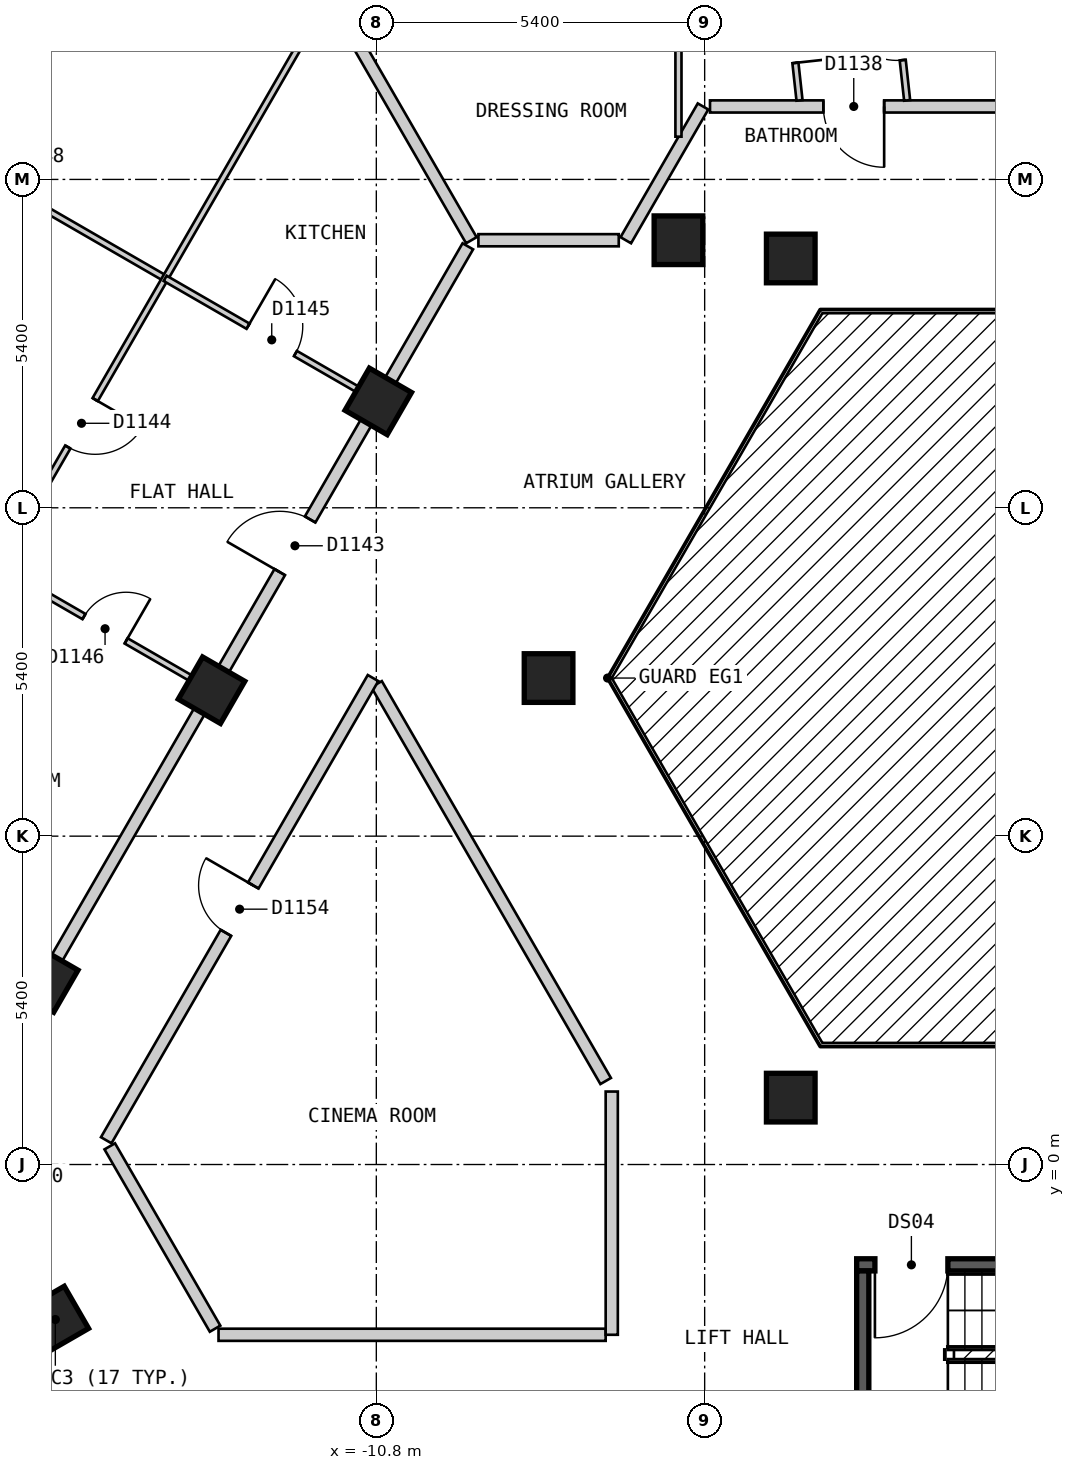
"""IFC4 building model, lengths in metres.
Left out: names, types, materials, properties, quantities, classifications, styles, units other than length and angle.
Written with IfcOpenShell. Run it as: python <this file> out.ifc"""

import sys

from ifc_helpers import new_model, si_unit, direction, frame, frame_2d, origin, origin_2d, place, context, subcontext, project, spatial, polyline, rectangle, outline, extrude, element, fill, save


model = new_model("IFC4")
c1 = context("Model", 3, precision=1e-05, world=origin(), true_north=direction((0.0, 1.0)))
c2 = subcontext(c1, "Body", "Model", "MODEL_VIEW")
j1 = project(units=[si_unit("LENGTHUNIT", "METRE"), si_unit("PLANEANGLEUNIT", "RADIAN")], contexts=[c1])
p1 = place(None, origin())
s1 = spatial("IfcSite", under=j1, at=p1, CompositionType="ELEMENT")
p2 = place(p1, origin())
s2 = spatial("IfcBuilding", under=s1, at=p2, CompositionType="ELEMENT")
p3 = place(p2, frame((0.0, 0.0, 138.6)))
s3 = spatial("IfcBuildingStorey", under=s2, at=p3, CompositionType="ELEMENT", Elevation=138.6)
for number, where, z_axis, x_axis in (
    (1, (-16.079, -2.549, 0.0), (0.0, 0.0, 1.0), (0.5, -0.866, 0.0)),
    (2, (-3.984, 14.9, 0.0), (0.0, 0.0, 1.0), (1.0, 0.0, 0.0)),
    (3, (-5.831, 15.2, 0.0), (0.0, 0.0, 1.0), (-1.0, 0.0, 0.0)),
    (4, (-10.768, 12.55, 0.0), (0.0, 0.0, 1.0), (-0.5, -0.866, 0.0)),
    (5, (-7.967, 8.0, 0.0), (0.0, 0.0, 1.0), (1.0, 0.0, 0.0)),
    (6, (-13.51, 7.8, 0.0), (0.0, 0.0, 1.0), (-0.5, -0.866, 0.0)),
    (7, (-3.984, 1.1, 0.0), (0.0, 0.0, 1.0), (1.0, 0.0, 0.0)),
    (8, (-16.253, 3.05, 0.0), (0.0, 0.0, 1.0), (-0.5, -0.866, 0.0)),
):
    element("IfcColumn", number, at=place(p3, frame(where, z_axis=z_axis, x_axis=x_axis)), inside=s3, PredefinedType="COLUMN", context=c2, shape_type="SweptSolid", body=[
        extrude(rectangle(XDim=0.8, YDim=0.8, at=origin_2d()), origin(), (0.0, 0.0, 1.0), 3.0),
    ])
p4 = place(p3, frame((-28.218, -2.025, 0.0), z_axis=(0.0, 0.0, 1.0), x_axis=(0.500017503135, -0.866015298109, 0.0)))
e9 = element("IfcWall", 9, at=p4, inside=s3, PredefinedType="SOLIDWALL", context=c2, shape_type="SweptSolid", body=[
    extrude(outline(polyline([(0.0, -0.15), (24.711, -0.15), (24.631, 0.15), (0.08, 0.15), (0.0, -0.15)])), origin(), (0.0, 0.0, 1.0), 2.7),
])
p5 = place(p4, frame((1.4, 0.0, 0.15)))
e10 = element("IfcOpeningElement", 10, at=p5, cuts=e9, PredefinedType="OPENING", context=c2, shape_type="SweptSolid", body=[
    extrude(rectangle(XDim=1.5, YDim=2.1, at=frame_2d((0.75, 1.05))), frame((0.0, 0.16, 0.0), z_axis=(0.0, -1.0, 0.0), x_axis=(1.0, 0.0, 0.0)), (0.0, 0.0, 1.0), 0.32),
])
p6 = place(p4, frame((4.316, 0.0, 0.15)))
e11 = element("IfcOpeningElement", 11, at=p6, cuts=e9, PredefinedType="OPENING", context=c2, shape_type="SweptSolid", body=[
    extrude(rectangle(XDim=1.5, YDim=2.1, at=frame_2d((0.75, 1.05))), frame((0.0, 0.16, 0.0), z_axis=(0.0, -1.0, 0.0), x_axis=(1.0, 0.0, 0.0)), (0.0, 0.0, 1.0), 0.32),
])
p7 = place(p4, frame((7.231, 0.0, 0.15)))
e12 = element("IfcOpeningElement", 12, at=p7, cuts=e9, PredefinedType="OPENING", context=c2, shape_type="SweptSolid", body=[
    extrude(rectangle(XDim=1.5, YDim=2.1, at=frame_2d((0.75, 1.05))), frame((0.0, 0.16, 0.0), z_axis=(0.0, -1.0, 0.0), x_axis=(1.0, 0.0, 0.0)), (0.0, 0.0, 1.0), 0.32),
])
p8 = place(p4, frame((10.147, 0.0, 0.15)))
e13 = element("IfcOpeningElement", 13, at=p8, cuts=e9, PredefinedType="OPENING", context=c2, shape_type="SweptSolid", body=[
    extrude(rectangle(XDim=1.5, YDim=2.1, at=frame_2d((0.75, 1.05))), frame((0.0, 0.16, 0.0), z_axis=(0.0, -1.0, 0.0), x_axis=(1.0, 0.0, 0.0)), (0.0, 0.0, 1.0), 0.32),
])
p9 = place(p4, frame((13.062, 0.0, 0.15)))
e14 = element("IfcOpeningElement", 14, at=p9, cuts=e9, PredefinedType="OPENING", context=c2, shape_type="SweptSolid", body=[
    extrude(rectangle(XDim=1.5, YDim=2.1, at=frame_2d((0.75, 1.05))), frame((0.0, 0.16, 0.0), z_axis=(0.0, -1.0, 0.0), x_axis=(1.0, 0.0, 0.0)), (0.0, 0.0, 1.0), 0.32),
])
p10 = place(p4, frame((15.977, 0.0, 0.15)))
e15 = element("IfcOpeningElement", 15, at=p10, cuts=e9, PredefinedType="OPENING", context=c2, shape_type="SweptSolid", body=[
    extrude(rectangle(XDim=1.5, YDim=2.1, at=frame_2d((0.75, 1.05))), frame((0.0, 0.16, 0.0), z_axis=(0.0, -1.0, 0.0), x_axis=(1.0, 0.0, 0.0)), (0.0, 0.0, 1.0), 0.32),
])
p11 = place(p4, frame((18.893, 0.0, 0.15)))
e16 = element("IfcOpeningElement", 16, at=p11, cuts=e9, PredefinedType="OPENING", context=c2, shape_type="SweptSolid", body=[
    extrude(rectangle(XDim=1.5, YDim=2.1, at=frame_2d((0.75, 1.05))), frame((0.0, 0.16, 0.0), z_axis=(0.0, -1.0, 0.0), x_axis=(1.0, 0.0, 0.0)), (0.0, 0.0, 1.0), 0.32),
])
p12 = place(p4, frame((21.809, 0.0, 0.15)))
e17 = element("IfcOpeningElement", 17, at=p12, cuts=e9, PredefinedType="OPENING", context=c2, shape_type="SweptSolid", body=[
    extrude(rectangle(XDim=1.5, YDim=2.1, at=frame_2d((0.75, 1.05))), frame((0.0, 0.16, 0.0), z_axis=(0.0, -1.0, 0.0), x_axis=(1.0, 0.0, 0.0)), (0.0, 0.0, 1.0), 0.32),
])
p13 = place(p3, frame((-2.9, -1.65, 0.0), z_axis=(0.0, 0.0, 1.0), x_axis=(1.0, 0.0, 0.0)))
e18 = element("IfcWall", 18, at=p13, inside=s3, PredefinedType="SOLIDWALL", context=c2, shape_type="SweptSolid", body=[
    extrude(rectangle(XDim=5.8, YDim=0.2, at=frame_2d((2.9, 0.0))), origin(), (0.0, 0.0, 1.0), 2.7),
])
p14 = place(p13, frame((0.3, 0.0, 0.0)))
e19 = element("IfcOpeningElement", 19, at=p14, cuts=e18, PredefinedType="OPENING", context=c2, shape_type="SweptSolid", body=[
    extrude(rectangle(XDim=1.2, YDim=2.1, at=frame_2d((0.6, 1.05))), frame((0.0, 0.11, 0.0), z_axis=(0.0, -1.0, 0.0), x_axis=(1.0, 0.0, 0.0)), (0.0, 0.0, 1.0), 0.22),
])
p15 = place(p3, frame((-2.8, -4.5, 0.0), z_axis=(0.0, 0.0, 1.0), x_axis=(0.0, 1.0, 0.0)))
e20 = element("IfcWall", 20, at=p15, inside=s3, PredefinedType="SOLIDWALL", context=c2, shape_type="SweptSolid", body=[
    extrude(rectangle(XDim=2.75, YDim=0.2, at=frame_2d((1.375, 0.0))), origin(), (0.0, 0.0, 1.0), 2.7),
])
p16 = place(p3, frame((-10.796, 7.9, 0.0), z_axis=(0.0, 0.0, 1.0), x_axis=(0.499954271211, -0.866051803703, 0.0)))
e21 = element("IfcWall", 21, at=p16, inside=s3, PredefinedType="PARTITIONING", context=c2, shape_type="SweptSolid", body=[
    extrude(rectangle(XDim=7.536, YDim=0.2, at=frame_2d((3.768, 0.0))), origin(), (0.0, 0.0, 1.0), 2.7),
])
p17 = place(p3, frame((-15.184, 0.299, 0.0), z_axis=(0.0, 0.0, 1.0), x_axis=(0.500149577091, -0.865939028186, 0.0)))
e22 = element("IfcWall", 22, at=p17, inside=s3, PredefinedType="PARTITIONING", context=c2, shape_type="SweptSolid", body=[
    extrude(rectangle(XDim=3.463, YDim=0.2, at=frame_2d((1.732, 0.0))), origin(), (0.0, 0.0, 1.0), 2.7),
])
p18 = place(p3, frame((-17.724, 0.299, 0.0), z_axis=(0.0, 0.0, 1.0), x_axis=(0.499910220442, -0.866077231832, 0.0)))
e23 = element("IfcWall", 23, at=p18, inside=s3, PredefinedType="PARTITIONING", context=c2, shape_type="SweptSolid", body=[
    extrude(rectangle(XDim=3.189, YDim=0.2, at=frame_2d((1.594, 0.0))), origin(), (0.0, 0.0, 1.0), 2.7),
])
p19 = place(p18, frame((0.183, 0.0, 0.0)))
e24 = element("IfcOpeningElement", 24, at=p19, cuts=e23, PredefinedType="OPENING", context=c2, shape_type="SweptSolid", body=[
    extrude(rectangle(XDim=0.8, YDim=2.1, at=frame_2d((0.4, 1.05))), frame((0.0, 0.11, 0.0), z_axis=(0.0, -1.0, 0.0), x_axis=(1.0, 0.0, 0.0)), (0.0, 0.0, 1.0), 0.22),
])
p20 = place(p3, frame((-13.395, -2.8, 0.0), z_axis=(0.0, 0.0, 1.0), x_axis=(1.0, 0.0, 0.0)))
e25 = element("IfcWall", 25, at=p20, inside=s3, PredefinedType="PARTITIONING", context=c2, shape_type="SweptSolid", body=[
    extrude(rectangle(XDim=6.367, YDim=0.2, at=frame_2d((3.184, 0.0))), origin(), (0.0, 0.0, 1.0), 2.7),
])
p21 = place(p3, frame((-9.121, 15.2, 0.0), z_axis=(0.0, 0.0, 1.0), x_axis=(1.0, 0.0, 0.0)))
e26 = element("IfcWall", 26, at=p21, inside=s3, PredefinedType="PARTITIONING", context=c2, shape_type="SweptSolid", body=[
    extrude(rectangle(XDim=2.308, YDim=0.2, at=frame_2d((1.154, 0.0))), origin(), (0.0, 0.0, 1.0), 2.7),
])
p22 = place(p3, frame((-5.312, 17.4, 0.0), z_axis=(0.0, 0.0, 1.0), x_axis=(1.0, 0.0, 0.0)))
e27 = element("IfcWall", 27, at=p22, inside=s3, PredefinedType="PARTITIONING", context=c2, shape_type="SweptSolid", body=[
    extrude(rectangle(XDim=10.739, YDim=0.2, at=frame_2d((5.37, 0.0))), origin(), (0.0, 0.0, 1.0), 2.7),
])
p23 = place(p22, frame((7.538, 0.0, 0.0)))
e28 = element("IfcOpeningElement", 28, at=p23, cuts=e27, PredefinedType="OPENING", context=c2, shape_type="SweptSolid", body=[
    extrude(rectangle(XDim=1.0, YDim=2.1, at=frame_2d((0.5, 1.05))), frame((0.0, 0.11, 0.0), z_axis=(0.0, -1.0, 0.0), x_axis=(1.0, 0.0, 0.0)), (0.0, 0.0, 1.0), 0.22),
])
p24 = place(p22, frame((1.864, 0.0, 0.0)))
e29 = element("IfcOpeningElement", 29, at=p24, cuts=e27, PredefinedType="OPENING", context=c2, shape_type="SweptSolid", body=[
    extrude(rectangle(XDim=1.0, YDim=2.1, at=frame_2d((0.5, 1.05))), frame((0.0, 0.11, 0.0), z_axis=(0.0, -1.0, 0.0), x_axis=(1.0, 0.0, 0.0)), (0.0, 0.0, 1.0), 0.22),
])
p25 = place(p3, frame((-15.242, 0.399, 0.0), z_axis=(0.0, 0.0, 1.0), x_axis=(0.499953615651, 0.866052182145, 0.0)))
e30 = element("IfcWall", 30, at=p25, inside=s3, PredefinedType="PARTITIONING", context=c2, shape_type="SweptSolid", body=[
    extrude(rectangle(XDim=8.777, YDim=0.2, at=frame_2d((4.388, 0.0))), origin(), (0.0, 0.0, 1.0), 2.7),
])
p26 = place(p25, frame((3.938, 0.0, 0.0)))
e31 = element("IfcOpeningElement", 31, at=p26, cuts=e30, PredefinedType="OPENING", context=c2, shape_type="SweptSolid", body=[
    extrude(rectangle(XDim=0.9, YDim=2.1, at=frame_2d((0.45, 1.05))), frame((0.0, 0.11, 0.0), z_axis=(0.0, -1.0, 0.0), x_axis=(1.0, 0.0, 0.0)), (0.0, 0.0, 1.0), 0.22),
])
p27 = place(p3, frame((-6.697, 15.2, 0.0), z_axis=(0.0, 0.0, 1.0), x_axis=(0.499963722229, 0.866046347752, 0.0)))
e32 = element("IfcWall", 32, at=p27, inside=s3, PredefinedType="PARTITIONING", context=c2, shape_type="SweptSolid", body=[
    extrude(rectangle(XDim=2.54, YDim=0.2, at=frame_2d((1.27, 0.0))), origin(), (0.0, 0.0, 1.0), 2.7),
])
p28 = place(p3, frame((-17.724, 0.5, 0.0), z_axis=(0.0, 0.0, 1.0), x_axis=(0.499992388462, 0.866029798263, 0.0)))
e33 = element("IfcWall", 33, at=p28, inside=s3, PredefinedType="PARTITIONING", context=c2, shape_type="SweptSolid", body=[
    extrude(rectangle(XDim=16.859, YDim=0.2, at=frame_2d((8.429, 0.0))), origin(), (0.0, 0.0, 1.0), 2.7),
])
p29 = place(p28, frame((10.672, 0.0, 0.0)))
e34 = element("IfcOpeningElement", 34, at=p29, cuts=e33, PredefinedType="OPENING", context=c2, shape_type="SweptSolid", body=[
    extrude(rectangle(XDim=1.0, YDim=2.1, at=frame_2d((0.5, 1.05))), frame((0.0, 0.11, 0.0), z_axis=(0.0, -1.0, 0.0), x_axis=(1.0, 0.0, 0.0)), (0.0, 0.0, 1.0), 0.22),
])
p30 = place(p3, frame((-6.928, -2.8, 0.0), z_axis=(0.0, 0.0, 1.0), x_axis=(0.0, 1.0, 0.0)))
e35 = element("IfcWall", 35, at=p30, inside=s3, PredefinedType="PARTITIONING", context=c2, shape_type="SweptSolid", body=[
    extrude(rectangle(XDim=4.0, YDim=0.2, at=frame_2d((2.0, 0.0))), origin(), (0.0, 0.0, 1.0), 2.7),
])
p31 = place(p3, frame((-2.319, 19.77, 0.0), z_axis=(0.0, 0.0, 1.0), x_axis=(0.109046821538, -0.994036614372, 0.0)))
e36 = element("IfcWall", 36, at=p31, inside=s3, PredefinedType="PARTITIONING", context=c2, shape_type="SweptSolid", body=[
    extrude(rectangle(XDim=2.284, YDim=0.1, at=frame_2d((1.142, 0.0))), origin(), (0.0, 0.0, 1.0), 2.7),
])
p32 = place(p31, frame((0.717, 0.0, 0.0)))
e37 = element("IfcOpeningElement", 37, at=p32, cuts=e36, PredefinedType="OPENING", context=c2, shape_type="SweptSolid", body=[
    extrude(rectangle(XDim=0.9, YDim=2.1, at=frame_2d((0.45, 1.05))), frame((0.0, 0.06, 0.0), z_axis=(0.0, -1.0, 0.0), x_axis=(1.0, 0.0, 0.0)), (0.0, 0.0, 1.0), 0.12),
])
p33 = place(p3, frame((-4.068, 19.579, 0.0), z_axis=(0.0, 0.0, 1.0), x_axis=(0.109022161139, -0.994039319333, 0.0)))
e38 = element("IfcWall", 38, at=p33, inside=s3, PredefinedType="PARTITIONING", context=c2, shape_type="SweptSolid", body=[
    extrude(rectangle(XDim=2.092, YDim=0.1, at=frame_2d((1.046, 0.0))), origin(), (0.0, 0.0, 1.0), 2.7),
])
p34 = place(p33, frame((0.671, 0.0, 0.0)))
e39 = element("IfcOpeningElement", 39, at=p34, cuts=e38, PredefinedType="OPENING", context=c2, shape_type="SweptSolid", body=[
    extrude(rectangle(XDim=0.8, YDim=2.1, at=frame_2d((0.4, 1.05))), frame((0.0, 0.06, 0.0), z_axis=(0.0, -1.0, 0.0), x_axis=(1.0, 0.0, 0.0)), (0.0, 0.0, 1.0), 0.12),
])
p35 = place(p3, frame((-16.971, 9.798, 0.0), z_axis=(0.0, 0.0, 1.0), x_axis=(0.866087525071, -0.499892387336, 0.0)))
e40 = element("IfcWall", 40, at=p35, inside=s3, PredefinedType="PARTITIONING", context=c2, shape_type="SweptSolid", body=[
    extrude(rectangle(XDim=3.897, YDim=0.1, at=frame_2d((1.948, 0.0))), origin(), (0.0, 0.0, 1.0), 2.7),
])
p36 = place(p35, frame((1.574, 0.0, 0.0)))
e41 = element("IfcOpeningElement", 41, at=p36, cuts=e40, PredefinedType="OPENING", context=c2, shape_type="SweptSolid", body=[
    extrude(rectangle(XDim=0.8, YDim=2.1, at=frame_2d((0.4, 1.05))), frame((0.0, 0.06, 0.0), z_axis=(0.0, -1.0, 0.0), x_axis=(1.0, 0.0, 0.0)), (0.0, 0.0, 1.0), 0.12),
])
p37 = place(p3, frame((-19.514, 17.599, 0.0), z_axis=(0.0, 0.0, 1.0), x_axis=(0.866007554612, -0.500030914399, 0.0)))
e42 = element("IfcWall", 42, at=p37, inside=s3, PredefinedType="PARTITIONING", context=c2, shape_type="SweptSolid", body=[
    extrude(rectangle(XDim=6.052, YDim=0.1, at=frame_2d((3.026, 0.0))), origin(), (0.0, 0.0, 1.0), 2.7),
])
p38 = place(p37, frame((2.576, 0.0, 0.0)))
e43 = element("IfcOpeningElement", 43, at=p38, cuts=e42, PredefinedType="OPENING", context=c2, shape_type="SweptSolid", body=[
    extrude(rectangle(XDim=0.9, YDim=2.1, at=frame_2d((0.45, 1.05))), frame((0.0, 0.06, 0.0), z_axis=(0.0, -1.0, 0.0), x_axis=(1.0, 0.0, 0.0)), (0.0, 0.0, 1.0), 0.12),
])
p39 = place(p3, frame((-22.398, 0.499, 0.0), z_axis=(0.0, 0.0, 1.0), x_axis=(0.499981561717, 0.866036048871, 0.0)))
e44 = element("IfcWall", 44, at=p39, inside=s3, PredefinedType="PARTITIONING", context=c2, shape_type="SweptSolid", body=[
    extrude(rectangle(XDim=21.532, YDim=0.1, at=frame_2d((10.766, 0.0))), origin(), (0.0, 0.0, 1.0), 2.7),
])
p40 = place(p39, frame((13.049, 0.0, 0.0)))
e45 = element("IfcOpeningElement", 45, at=p40, cuts=e44, PredefinedType="OPENING", context=c2, shape_type="SweptSolid", body=[
    extrude(rectangle(XDim=0.9, YDim=2.1, at=frame_2d((0.45, 1.05))), frame((0.0, 0.06, 0.0), z_axis=(0.0, -1.0, 0.0), x_axis=(1.0, 0.0, 0.0)), (0.0, 0.0, 1.0), 0.12),
])
p41 = place(p39, frame((2.183, 0.0, 0.0)))
e46 = element("IfcOpeningElement", 46, at=p41, cuts=e44, PredefinedType="OPENING", context=c2, shape_type="SweptSolid", body=[
    extrude(rectangle(XDim=0.8, YDim=2.1, at=frame_2d((0.4, 1.05))), frame((0.0, 0.06, 0.0), z_axis=(0.0, -1.0, 0.0), x_axis=(1.0, 0.0, 0.0)), (0.0, 0.0, 1.0), 0.12),
])
p42 = place(p3, frame((-5.831, 16.903, 0.0), z_axis=(0.0, 0.0, 1.0), x_axis=(0.0, 1.0, 0.0)))
e47 = element("IfcWall", 47, at=p42, inside=s3, PredefinedType="PARTITIONING", context=c2, shape_type="SweptSolid", body=[
    extrude(rectangle(XDim=2.553, YDim=0.1, at=frame_2d((1.276, 0.0))), origin(), (0.0, 0.0, 1.0), 2.7),
])
p43 = place(p3, frame((-11.52, 19.155, 0.0), z_axis=(0.0, 0.0, 1.0), x_axis=(0.499916824138, -0.866073420066, 0.0)))
e48 = element("IfcWall", 48, at=p43, inside=s3, PredefinedType="PARTITIONING", context=c2, shape_type="SweptSolid", body=[
    extrude(rectangle(XDim=4.567, YDim=0.2, at=frame_2d((2.283, 0.0))), origin(), (0.0, 0.0, 1.0), 2.7),
])
p44 = place(p3, frame((-17.956, -3.783, 0.0), z_axis=(0.0, 0.0, 1.0), x_axis=(0.964815336827, -0.2629284424, 0.0)))
e49 = element("IfcWall", 49, at=p44, inside=s3, PredefinedType="PARTITIONING", context=c2, shape_type="SweptSolid", body=[
    extrude(rectangle(XDim=2.514, YDim=0.2, at=frame_2d((1.257, 0.0))), origin(), (0.0, 0.0, 1.0), 2.7),
])
p45 = place(p3, frame((-18.096, -3.714, 0.0), z_axis=(0.0, 0.0, 1.0), x_axis=(0.865794513859, 0.500399700011, 0.0)))
e50 = element("IfcWall", 50, at=p45, inside=s3, PredefinedType="PARTITIONING", context=c2, shape_type="SweptSolid", body=[
    extrude(rectangle(XDim=2.298, YDim=0.2, at=frame_2d((1.149, 0.0))), origin(), (0.0, 0.0, 1.0), 2.7),
])
p46 = place(p3, frame((-14.273, 14.573, 0.0), z_axis=(0.0, 0.0, 1.0), x_axis=(0.866138216955, -0.499804550929, 0.0)))
e51 = element("IfcWall", 51, at=p46, inside=s3, PredefinedType="PARTITIONING", context=c2, shape_type="SweptSolid", body=[
    extrude(rectangle(XDim=3.947, YDim=0.1, at=frame_2d((1.974, 0.0))), origin(), (0.0, 0.0, 1.0), 2.7),
])
p47 = place(p46, frame((1.574, 0.0, 0.0)))
e52 = element("IfcOpeningElement", 52, at=p47, cuts=e51, PredefinedType="OPENING", context=c2, shape_type="SweptSolid", body=[
    extrude(rectangle(XDim=0.9, YDim=2.1, at=frame_2d((0.45, 1.05))), frame((0.0, 0.06, 0.0), z_axis=(0.0, -1.0, 0.0), x_axis=(1.0, 0.0, 0.0)), (0.0, 0.0, 1.0), 0.12),
])
p48 = place(p14, origin())
e53 = element("IfcDoor", 53, at=p48, inside=s3, OperationType="SINGLE_SWING_LEFT", PredefinedType="DOOR", context=c2, shape_type="SweptSolid", body=[
    extrude(rectangle(XDim=1.2, YDim=2.1, at=frame_2d((0.6, 1.05))), frame((0.0, 0.025, 0.0), z_axis=(0.0, -1.0, 0.0), x_axis=(1.0, 0.0, 0.0)), (0.0, 0.0, 1.0), 0.05),
])
fill(e19, e53)
p49 = place(p24, origin())
e54 = element("IfcDoor", 54, at=p49, inside=s3, OperationType="SINGLE_SWING_RIGHT", PredefinedType="DOOR", context=c2, shape_type="SweptSolid", body=[
    extrude(rectangle(XDim=1.0, YDim=2.1, at=frame_2d((0.5, 1.05))), frame((0.0, 0.025, 0.0), z_axis=(0.0, -1.0, 0.0), x_axis=(1.0, 0.0, 0.0)), (0.0, 0.0, 1.0), 0.05),
])
fill(e29, e54)
p50 = place(p32, origin())
e55 = element("IfcDoor", 55, at=p50, inside=s3, OperationType="SINGLE_SWING_LEFT", PredefinedType="DOOR", context=c2, shape_type="SweptSolid", body=[
    extrude(rectangle(XDim=0.9, YDim=2.1, at=frame_2d((0.45, 1.05))), frame((0.0, 0.025, 0.0), z_axis=(0.0, -1.0, 0.0), x_axis=(1.0, 0.0, 0.0)), (0.0, 0.0, 1.0), 0.05),
])
fill(e37, e55)
p51 = place(p34, origin())
e56 = element("IfcDoor", 56, at=p51, inside=s3, OperationType="SINGLE_SWING_RIGHT", PredefinedType="DOOR", context=c2, shape_type="SweptSolid", body=[
    extrude(rectangle(XDim=0.8, YDim=2.1, at=frame_2d((0.4, 1.05))), frame((0.0, 0.025, 0.0), z_axis=(0.0, -1.0, 0.0), x_axis=(1.0, 0.0, 0.0)), (0.0, 0.0, 1.0), 0.05),
])
fill(e39, e56)
p52 = place(p29, origin())
e57 = element("IfcDoor", 57, at=p52, inside=s3, OperationType="SINGLE_SWING_LEFT", PredefinedType="DOOR", context=c2, shape_type="SweptSolid", body=[
    extrude(rectangle(XDim=1.0, YDim=2.1, at=frame_2d((0.5, 1.05))), frame((0.0, 0.025, 0.0), z_axis=(0.0, -1.0, 0.0), x_axis=(1.0, 0.0, 0.0)), (0.0, 0.0, 1.0), 0.05),
])
fill(e34, e57)
p53 = place(p40, origin())
e58 = element("IfcDoor", 58, at=p53, inside=s3, OperationType="SINGLE_SWING_RIGHT", PredefinedType="DOOR", context=c2, shape_type="SweptSolid", body=[
    extrude(rectangle(XDim=0.9, YDim=2.1, at=frame_2d((0.45, 1.05))), frame((0.0, 0.025, 0.0), z_axis=(0.0, -1.0, 0.0), x_axis=(1.0, 0.0, 0.0)), (0.0, 0.0, 1.0), 0.05),
])
fill(e45, e58)
p54 = place(p47, origin())
e59 = element("IfcDoor", 59, at=p54, inside=s3, OperationType="SINGLE_SWING_LEFT", PredefinedType="DOOR", context=c2, shape_type="SweptSolid", body=[
    extrude(rectangle(XDim=0.9, YDim=2.1, at=frame_2d((0.45, 1.05))), frame((0.0, 0.025, 0.0), z_axis=(0.0, -1.0, 0.0), x_axis=(1.0, 0.0, 0.0)), (0.0, 0.0, 1.0), 0.05),
])
fill(e52, e59)
p55 = place(p36, origin())
e60 = element("IfcDoor", 60, at=p55, inside=s3, OperationType="SINGLE_SWING_RIGHT", PredefinedType="DOOR", context=c2, shape_type="SweptSolid", body=[
    extrude(rectangle(XDim=0.8, YDim=2.1, at=frame_2d((0.4, 1.05))), frame((0.0, 0.025, 0.0), z_axis=(0.0, -1.0, 0.0), x_axis=(1.0, 0.0, 0.0)), (0.0, 0.0, 1.0), 0.05),
])
fill(e41, e60)
p56 = place(p26, origin())
e61 = element("IfcDoor", 61, at=p56, inside=s3, OperationType="SINGLE_SWING_RIGHT", PredefinedType="DOOR", context=c2, shape_type="SweptSolid", body=[
    extrude(rectangle(XDim=0.9, YDim=2.1, at=frame_2d((0.45, 1.05))), frame((0.0, 0.025, 0.0), z_axis=(0.0, -1.0, 0.0), x_axis=(1.0, 0.0, 0.0)), (0.0, 0.0, 1.0), 0.05),
])
fill(e31, e61)
save(model, sys.argv[1])
